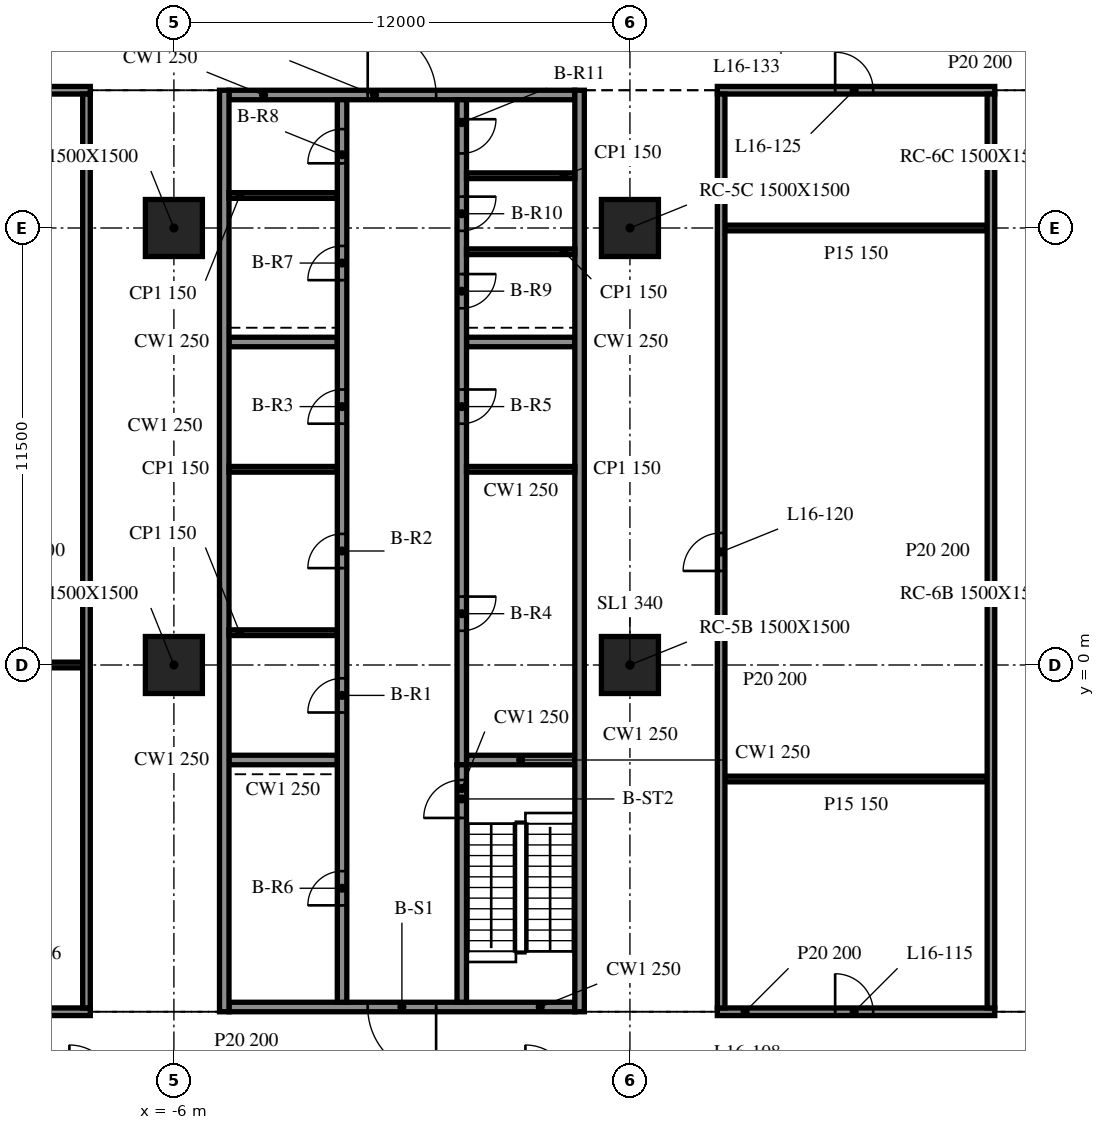
"""IFC4 building model, lengths in metres.
Left out: names, types, materials, properties, quantities, classifications, styles, units other than length and angle.
Written with IfcOpenShell. Run it as: python <this file> out.ifc"""

import sys

from ifc_helpers import new_model, si_unit, direction, frame, frame_2d, origin, origin_2d, place, context, subcontext, project, spatial, rectangle, extrude, element, fill, save


model = new_model("IFC4")
c1 = context("Model", 3, precision=1e-05, world=origin(), true_north=direction((0.0, 1.0)))
c2 = subcontext(c1, "Body", "Model", "MODEL_VIEW")
j1 = project(units=[si_unit("LENGTHUNIT", "METRE"), si_unit("PLANEANGLEUNIT", "RADIAN")], contexts=[c1])
p1 = place(None, origin())
s1 = spatial("IfcSite", under=j1, at=p1, CompositionType="ELEMENT")
p2 = place(p1, origin())
s2 = spatial("IfcBuilding", under=s1, at=p2, CompositionType="ELEMENT")
p3 = place(p2, frame((0.0, 0.0, 71.8)))
s3 = spatial("IfcBuildingStorey", under=s2, at=p3, CompositionType="ELEMENT", Elevation=71.8)
for number, where, z_axis, x_axis in (
    (1, (-6.0, 0.0, -0.34), (0.0, 0.0, 1.0), (1.0, 0.0, 0.0)),
    (2, (-6.0, 11.5, -0.34), (0.0, 0.0, 1.0), (1.0, 0.0, 0.0)),
    (3, (6.0, 0.0, -0.34), (0.0, 0.0, 1.0), (1.0, 0.0, 0.0)),
    (4, (6.0, 11.5, -0.34), (0.0, 0.0, 1.0), (1.0, 0.0, 0.0)),
):
    element("IfcColumn", number, at=place(p3, frame(where, z_axis=z_axis, x_axis=x_axis)), inside=s3, PredefinedType="COLUMN", context=c2, shape_type="SweptSolid", body=[
        extrude(rectangle(XDim=1.5, YDim=1.5, at=origin_2d()), origin(), (0.0, 0.0, 1.0), 4.3),
    ])
for number, where, z_axis, x_axis in (
    (5, (-4.675, 15.125, 0.0), (0.0, 0.0, 1.0), (0.0, -1.0, 0.0)),
    (6, (4.675, -9.125, 0.0), (0.0, 0.0, 1.0), (0.0, 1.0, 0.0)),
):
    element("IfcWall", number, at=place(p3, frame(where, z_axis=z_axis, x_axis=x_axis)), inside=s3, PredefinedType="SOLIDWALL", context=c2, shape_type="SweptSolid", body=[
        extrude(rectangle(XDim=24.25, YDim=0.25, at=frame_2d((12.125, 0.0))), origin(), (0.0, 0.0, 1.0), 3.96),
    ])
p4 = place(p3, frame((4.55, -9.0, 0.0), z_axis=(0.0, 0.0, 1.0), x_axis=(-1.0, 0.0, 0.0)))
e7 = element("IfcWall", 7, at=p4, inside=s3, PredefinedType="SOLIDWALL", context=c2, shape_type="SweptSolid", body=[
    extrude(rectangle(XDim=9.1, YDim=0.25, at=frame_2d((4.55, 0.0))), origin(), (0.0, 0.0, 1.0), 3.96),
])
p5 = place(p4, frame((3.65, 0.0, 0.0)))
e8 = element("IfcOpeningElement", 8, at=p5, cuts=e7, PredefinedType="OPENING", context=c2, shape_type="SweptSolid", body=[
    extrude(rectangle(XDim=1.8, YDim=2.1, at=frame_2d((0.9, 1.05))), frame((0.0, 0.135, 0.0), z_axis=(0.0, -1.0, 0.0), x_axis=(1.0, 0.0, 0.0)), (0.0, 0.0, 1.0), 0.27),
])
p6 = place(p3, frame((-4.55, 15.0, 0.0), z_axis=(0.0, 0.0, 1.0), x_axis=(1.0, 0.0, 0.0)))
e9 = element("IfcWall", 9, at=p6, inside=s3, PredefinedType="SOLIDWALL", context=c2, shape_type="SweptSolid", body=[
    extrude(rectangle(XDim=9.1, YDim=0.25, at=frame_2d((4.55, 0.0))), origin(), (0.0, 0.0, 1.0), 3.96),
])
p7 = place(p6, frame((3.65, 0.0, 0.0)))
e10 = element("IfcOpeningElement", 10, at=p7, cuts=e9, PredefinedType="OPENING", context=c2, shape_type="SweptSolid", body=[
    extrude(rectangle(XDim=1.8, YDim=2.1, at=frame_2d((0.9, 1.05))), frame((0.0, 0.135, 0.0), z_axis=(0.0, -1.0, 0.0), x_axis=(1.0, 0.0, 0.0)), (0.0, 0.0, 1.0), 0.27),
])
p8 = place(p3, frame((-1.575, -8.875, 0.0), z_axis=(0.0, 0.0, 1.0), x_axis=(0.0, 1.0, 0.0)))
e11 = element("IfcWall", 11, at=p8, inside=s3, PredefinedType="SOLIDWALL", context=c2, shape_type="SweptSolid", body=[
    extrude(rectangle(XDim=23.75, YDim=0.25, at=frame_2d((11.875, 0.0))), origin(), (0.0, 0.0, 1.0), 3.96),
])
p9 = place(p8, frame((7.625, 0.0, 0.0)))
e12 = element("IfcOpeningElement", 12, at=p9, cuts=e11, PredefinedType="OPENING", context=c2, shape_type="SweptSolid", body=[
    extrude(rectangle(XDim=0.9, YDim=2.1, at=frame_2d((0.45, 1.05))), frame((0.0, 0.135, 0.0), z_axis=(0.0, -1.0, 0.0), x_axis=(1.0, 0.0, 0.0)), (0.0, 0.0, 1.0), 0.27),
])
p10 = place(p8, frame((11.425, 0.0, 0.0)))
e13 = element("IfcOpeningElement", 13, at=p10, cuts=e11, PredefinedType="OPENING", context=c2, shape_type="SweptSolid", body=[
    extrude(rectangle(XDim=0.9, YDim=2.1, at=frame_2d((0.45, 1.05))), frame((0.0, 0.135, 0.0), z_axis=(0.0, -1.0, 0.0), x_axis=(1.0, 0.0, 0.0)), (0.0, 0.0, 1.0), 0.27),
])
p11 = place(p8, frame((15.225, 0.0, 0.0)))
e14 = element("IfcOpeningElement", 14, at=p11, cuts=e11, PredefinedType="OPENING", context=c2, shape_type="SweptSolid", body=[
    extrude(rectangle(XDim=0.9, YDim=2.1, at=frame_2d((0.45, 1.05))), frame((0.0, 0.135, 0.0), z_axis=(0.0, -1.0, 0.0), x_axis=(1.0, 0.0, 0.0)), (0.0, 0.0, 1.0), 0.27),
])
p12 = place(p8, frame((2.55, 0.0, 0.0)))
e15 = element("IfcOpeningElement", 15, at=p12, cuts=e11, PredefinedType="OPENING", context=c2, shape_type="SweptSolid", body=[
    extrude(rectangle(XDim=0.9, YDim=2.1, at=frame_2d((0.45, 1.05))), frame((0.0, 0.135, 0.0), z_axis=(0.0, -1.0, 0.0), x_axis=(1.0, 0.0, 0.0)), (0.0, 0.0, 1.0), 0.27),
])
p13 = place(p8, frame((19.002, 0.0, 0.0)))
e16 = element("IfcOpeningElement", 16, at=p13, cuts=e11, PredefinedType="OPENING", context=c2, shape_type="SweptSolid", body=[
    extrude(rectangle(XDim=0.9, YDim=2.1, at=frame_2d((0.45, 1.05))), frame((0.0, 0.135, 0.0), z_axis=(0.0, -1.0, 0.0), x_axis=(1.0, 0.0, 0.0)), (0.0, 0.0, 1.0), 0.27),
])
p14 = place(p8, frame((22.077, 0.0, 0.0)))
e17 = element("IfcOpeningElement", 17, at=p14, cuts=e11, PredefinedType="OPENING", context=c2, shape_type="SweptSolid", body=[
    extrude(rectangle(XDim=0.9, YDim=2.1, at=frame_2d((0.45, 1.05))), frame((0.0, 0.135, 0.0), z_axis=(0.0, -1.0, 0.0), x_axis=(1.0, 0.0, 0.0)), (0.0, 0.0, 1.0), 0.27),
])
p15 = place(p3, frame((1.575, -8.875, 0.0), z_axis=(0.0, 0.0, 1.0), x_axis=(0.0, 1.0, 0.0)))
e18 = element("IfcWall", 18, at=p15, inside=s3, PredefinedType="SOLIDWALL", context=c2, shape_type="SweptSolid", body=[
    extrude(rectangle(XDim=6.25, YDim=0.25, at=frame_2d((3.125, 0.0))), origin(), (0.0, 0.0, 1.0), 3.96),
])
p16 = place(p15, frame((4.85, 0.0, 0.0)))
e19 = element("IfcOpeningElement", 19, at=p16, cuts=e18, PredefinedType="OPENING", context=c2, shape_type="SweptSolid", body=[
    extrude(rectangle(XDim=1.0, YDim=2.1, at=frame_2d((0.5, 1.05))), frame((0.0, 0.135, 0.0), z_axis=(0.0, -1.0, 0.0), x_axis=(1.0, 0.0, 0.0)), (0.0, 0.0, 1.0), 0.27),
])
p17 = place(p3, frame((1.575, 14.875, 0.0), z_axis=(0.0, 0.0, 1.0), x_axis=(0.0, -1.0, 0.0)))
e20 = element("IfcWall", 20, at=p17, inside=s3, PredefinedType="SOLIDWALL", context=c2, shape_type="SweptSolid", body=[
    extrude(rectangle(XDim=17.5, YDim=0.25, at=frame_2d((8.75, 0.0))), origin(), (0.0, 0.0, 1.0), 3.96),
])
p18 = place(p17, frame((13.075, 0.0, 0.0)))
e21 = element("IfcOpeningElement", 21, at=p18, cuts=e20, PredefinedType="OPENING", context=c2, shape_type="SweptSolid", body=[
    extrude(rectangle(XDim=0.9, YDim=2.1, at=frame_2d((0.45, 1.05))), frame((0.0, 0.135, 0.0), z_axis=(0.0, -1.0, 0.0), x_axis=(1.0, 0.0, 0.0)), (0.0, 0.0, 1.0), 0.27),
])
p19 = place(p17, frame((7.625, 0.0, 0.0)))
e22 = element("IfcOpeningElement", 22, at=p19, cuts=e20, PredefinedType="OPENING", context=c2, shape_type="SweptSolid", body=[
    extrude(rectangle(XDim=0.9, YDim=2.1, at=frame_2d((0.45, 1.05))), frame((0.0, 0.135, 0.0), z_axis=(0.0, -1.0, 0.0), x_axis=(1.0, 0.0, 0.0)), (0.0, 0.0, 1.0), 0.27),
])
p20 = place(p17, frame((4.587, 0.0, 0.0)))
e23 = element("IfcOpeningElement", 23, at=p20, cuts=e20, PredefinedType="OPENING", context=c2, shape_type="SweptSolid", body=[
    extrude(rectangle(XDim=0.9, YDim=2.1, at=frame_2d((0.45, 1.05))), frame((0.0, 0.135, 0.0), z_axis=(0.0, -1.0, 0.0), x_axis=(1.0, 0.0, 0.0)), (0.0, 0.0, 1.0), 0.27),
])
p21 = place(p17, frame((2.55, 0.0, 0.0)))
e24 = element("IfcOpeningElement", 24, at=p21, cuts=e20, PredefinedType="OPENING", context=c2, shape_type="SweptSolid", body=[
    extrude(rectangle(XDim=0.9, YDim=2.1, at=frame_2d((0.45, 1.05))), frame((0.0, 0.135, 0.0), z_axis=(0.0, -1.0, 0.0), x_axis=(1.0, 0.0, 0.0)), (0.0, 0.0, 1.0), 0.27),
])
p22 = place(p17, frame((0.512, 0.0, 0.0)))
e25 = element("IfcOpeningElement", 25, at=p22, cuts=e20, PredefinedType="OPENING", context=c2, shape_type="SweptSolid", body=[
    extrude(rectangle(XDim=0.9, YDim=2.1, at=frame_2d((0.45, 1.05))), frame((0.0, 0.135, 0.0), z_axis=(0.0, -1.0, 0.0), x_axis=(1.0, 0.0, 0.0)), (0.0, 0.0, 1.0), 0.27),
])
for number, where, z_axis, x_axis in (
    (26, (-4.55, -2.5, 0.0), (0.0, 0.0, 1.0), (1.0, 0.0, 0.0)),
    (27, (-4.55, 8.5, 0.0), (0.0, 0.0, 1.0), (1.0, 0.0, 0.0)),
    (28, (1.7, -2.5, 0.0), (0.0, 0.0, 1.0), (1.0, 0.0, 0.0)),
    (29, (1.7, 8.5, 0.0), (0.0, 0.0, 1.0), (1.0, 0.0, 0.0)),
):
    element("IfcWall", number, at=place(p3, frame(where, z_axis=z_axis, x_axis=x_axis)), inside=s3, PredefinedType="SOLIDWALL", context=c2, shape_type="SweptSolid", body=[
        extrude(rectangle(XDim=2.85, YDim=0.25, at=frame_2d((1.425, 0.0))), origin(), (0.0, 0.0, 1.0), 3.96),
    ])
for number, where, z_axis, x_axis in (
    (30, (-4.55, 0.85, 0.0), (0.0, 0.0, 1.0), (1.0, 0.0, 0.0)),
    (31, (-4.55, 5.15, 0.0), (0.0, 0.0, 1.0), (1.0, 0.0, 0.0)),
    (32, (1.7, 5.15, 0.0), (0.0, 0.0, 1.0), (1.0, 0.0, 0.0)),
    (33, (-4.55, 12.355, 0.0), (0.0, 0.0, 1.0), (1.0, 0.0, 0.0)),
    (34, (1.7, 10.875, 0.0), (0.0, 0.0, 1.0), (1.0, 0.0, 0.0)),
    (35, (1.7, 12.875, 0.0), (0.0, 0.0, 1.0), (1.0, 0.0, 0.0)),
):
    element("IfcWall", number, at=place(p3, frame(where, z_axis=z_axis, x_axis=x_axis)), inside=s3, PredefinedType="PARTITIONING", context=c2, shape_type="SweptSolid", body=[
        extrude(rectangle(XDim=2.85, YDim=0.15, at=frame_2d((1.425, 0.0))), origin(), (0.0, 0.0, 1.0), 3.96),
    ])
p23 = place(p3, frame((-15.9, -9.125, 0.0), z_axis=(0.0, 0.0, 1.0), x_axis=(1.0, 0.0, 0.0)))
e36 = element("IfcWall", 36, at=p23, inside=s3, PredefinedType="PARTITIONING", context=c2, shape_type="SweptSolid", body=[
    extrude(rectangle(XDim=7.7, YDim=0.2, at=frame_2d((3.85, 0.0))), origin(), (0.0, 0.0, 1.0), 3.96),
])
p24 = place(p23, frame((3.3, 0.0, 0.0)))
e37 = element("IfcOpeningElement", 37, at=p24, cuts=e36, PredefinedType="OPENING", context=c2, shape_type="SweptSolid", body=[
    extrude(rectangle(XDim=1.0, YDim=2.1, at=frame_2d((0.5, 1.05))), frame((0.0, 0.11, 0.0), z_axis=(0.0, -1.0, 0.0), x_axis=(1.0, 0.0, 0.0)), (0.0, 0.0, 1.0), 0.22),
])
p25 = place(p3, frame((8.3, -9.125, 0.0), z_axis=(0.0, 0.0, 1.0), x_axis=(1.0, 0.0, 0.0)))
e38 = element("IfcWall", 38, at=p25, inside=s3, PredefinedType="PARTITIONING", context=c2, shape_type="SweptSolid", body=[
    extrude(rectangle(XDim=7.3, YDim=0.2, at=frame_2d((3.65, 0.0))), origin(), (0.0, 0.0, 1.0), 3.96),
])
p26 = place(p25, frame((3.1, 0.0, 0.0)))
e39 = element("IfcOpeningElement", 39, at=p26, cuts=e38, PredefinedType="OPENING", context=c2, shape_type="SweptSolid", body=[
    extrude(rectangle(XDim=1.0, YDim=2.1, at=frame_2d((0.5, 1.05))), frame((0.0, 0.11, 0.0), z_axis=(0.0, -1.0, 0.0), x_axis=(1.0, 0.0, 0.0)), (0.0, 0.0, 1.0), 0.22),
])
p27 = place(p3, frame((8.5, -3.0, 0.0), z_axis=(0.0, 0.0, 1.0), x_axis=(1.0, 0.0, 0.0)))
e40 = element("IfcWall", 40, at=p27, inside=s3, PredefinedType="PARTITIONING", context=c2, shape_type="SweptSolid", body=[
    extrude(rectangle(XDim=6.9, YDim=0.15, at=frame_2d((3.45, 0.0))), origin(), (0.0, 0.0, 1.0), 3.96),
])
p28 = place(p3, frame((-15.7, 0.0, 0.0), z_axis=(0.0, 0.0, 1.0), x_axis=(1.0, 0.0, 0.0)))
e41 = element("IfcWall", 41, at=p28, inside=s3, PredefinedType="PARTITIONING", context=c2, shape_type="SweptSolid", body=[
    extrude(rectangle(XDim=7.3, YDim=0.15, at=frame_2d((3.65, 0.0))), origin(), (0.0, 0.0, 1.0), 3.96),
])
p29 = place(p3, frame((8.5, 11.5, 0.0), z_axis=(0.0, 0.0, 1.0), x_axis=(1.0, 0.0, 0.0)))
e42 = element("IfcWall", 42, at=p29, inside=s3, PredefinedType="PARTITIONING", context=c2, shape_type="SweptSolid", body=[
    extrude(rectangle(XDim=6.9, YDim=0.15, at=frame_2d((3.45, 0.0))), origin(), (0.0, 0.0, 1.0), 3.96),
])
p30 = place(p3, frame((-15.9, 15.125, 0.0), z_axis=(0.0, 0.0, 1.0), x_axis=(1.0, 0.0, 0.0)))
e43 = element("IfcWall", 43, at=p30, inside=s3, PredefinedType="PARTITIONING", context=c2, shape_type="SweptSolid", body=[
    extrude(rectangle(XDim=7.7, YDim=0.2, at=frame_2d((3.85, 0.0))), origin(), (0.0, 0.0, 1.0), 3.96),
])
p31 = place(p3, frame((8.3, 15.125, 0.0), z_axis=(0.0, 0.0, 1.0), x_axis=(1.0, 0.0, 0.0)))
e44 = element("IfcWall", 44, at=p31, inside=s3, PredefinedType="PARTITIONING", context=c2, shape_type="SweptSolid", body=[
    extrude(rectangle(XDim=7.3, YDim=0.2, at=frame_2d((3.65, 0.0))), origin(), (0.0, 0.0, 1.0), 3.96),
])
p32 = place(p31, frame((3.1, 0.0, 0.0)))
e45 = element("IfcOpeningElement", 45, at=p32, cuts=e44, PredefinedType="OPENING", context=c2, shape_type="SweptSolid", body=[
    extrude(rectangle(XDim=1.0, YDim=2.1, at=frame_2d((0.5, 1.05))), frame((0.0, 0.11, 0.0), z_axis=(0.0, -1.0, 0.0), x_axis=(1.0, 0.0, 0.0)), (0.0, 0.0, 1.0), 0.22),
])
p33 = place(p3, frame((-8.3, -9.025, 0.0), z_axis=(0.0, 0.0, 1.0), x_axis=(0.0, 1.0, 0.0)))
e46 = element("IfcWall", 46, at=p33, inside=s3, PredefinedType="PARTITIONING", context=c2, shape_type="SweptSolid", body=[
    extrude(rectangle(XDim=24.05, YDim=0.2, at=frame_2d((12.025, 0.0))), origin(), (0.0, 0.0, 1.0), 3.96),
])
p34 = place(p3, frame((8.4, -9.025, 0.0), z_axis=(0.0, 0.0, 1.0), x_axis=(0.0, 1.0, 0.0)))
e47 = element("IfcWall", 47, at=p34, inside=s3, PredefinedType="PARTITIONING", context=c2, shape_type="SweptSolid", body=[
    extrude(rectangle(XDim=24.05, YDim=0.2, at=frame_2d((12.025, 0.0))), origin(), (0.0, 0.0, 1.0), 3.96),
])
p35 = place(p34, frame((11.5, 0.0, 0.0)))
e48 = element("IfcOpeningElement", 48, at=p35, cuts=e47, PredefinedType="OPENING", context=c2, shape_type="SweptSolid", body=[
    extrude(rectangle(XDim=1.0, YDim=2.1, at=frame_2d((0.5, 1.05))), frame((0.0, 0.11, 0.0), z_axis=(0.0, -1.0, 0.0), x_axis=(1.0, 0.0, 0.0)), (0.0, 0.0, 1.0), 0.22),
])
p36 = place(p3, frame((15.5, -9.025, 0.0), z_axis=(0.0, 0.0, 1.0), x_axis=(0.0, 1.0, 0.0)))
e49 = element("IfcWall", 49, at=p36, inside=s3, PredefinedType="PARTITIONING", context=c2, shape_type="SweptSolid", body=[
    extrude(rectangle(XDim=24.05, YDim=0.2, at=frame_2d((12.025, 0.0))), origin(), (0.0, 0.0, 1.0), 3.96),
])
p37 = place(p5, origin())
e50 = element("IfcDoor", 50, at=p37, inside=s3, OperationType="DOUBLE_DOOR_SINGLE_SWING", PredefinedType="DOOR", context=c2, shape_type="SweptSolid", body=[
    extrude(rectangle(XDim=1.8, YDim=2.1, at=frame_2d((0.9, 1.05))), frame((0.0, 0.025, 0.0), z_axis=(0.0, -1.0, 0.0), x_axis=(1.0, 0.0, 0.0)), (0.0, 0.0, 1.0), 0.05),
])
fill(e8, e50)
p38 = place(p7, origin())
e51 = element("IfcDoor", 51, at=p38, inside=s3, OperationType="DOUBLE_DOOR_SINGLE_SWING", PredefinedType="DOOR", context=c2, shape_type="SweptSolid", body=[
    extrude(rectangle(XDim=1.8, YDim=2.1, at=frame_2d((0.9, 1.05))), frame((0.0, 0.025, 0.0), z_axis=(0.0, -1.0, 0.0), x_axis=(1.0, 0.0, 0.0)), (0.0, 0.0, 1.0), 0.05),
])
fill(e10, e51)
p39 = place(p9, origin())
e52 = element("IfcDoor", 52, at=p39, inside=s3, OperationType="SINGLE_SWING_LEFT", PredefinedType="DOOR", context=c2, shape_type="SweptSolid", body=[
    extrude(rectangle(XDim=0.9, YDim=2.1, at=frame_2d((0.45, 1.05))), frame((0.0, 0.025, 0.0), z_axis=(0.0, -1.0, 0.0), x_axis=(1.0, 0.0, 0.0)), (0.0, 0.0, 1.0), 0.05),
])
fill(e12, e52)
p40 = place(p10, origin())
e53 = element("IfcDoor", 53, at=p40, inside=s3, OperationType="SINGLE_SWING_RIGHT", PredefinedType="DOOR", context=c2, shape_type="SweptSolid", body=[
    extrude(rectangle(XDim=0.9, YDim=2.1, at=frame_2d((0.45, 1.05))), frame((0.0, 0.025, 0.0), z_axis=(0.0, -1.0, 0.0), x_axis=(1.0, 0.0, 0.0)), (0.0, 0.0, 1.0), 0.05),
])
fill(e13, e53)
p41 = place(p11, origin())
e54 = element("IfcDoor", 54, at=p41, inside=s3, OperationType="SINGLE_SWING_LEFT", PredefinedType="DOOR", context=c2, shape_type="SweptSolid", body=[
    extrude(rectangle(XDim=0.9, YDim=2.1, at=frame_2d((0.45, 1.05))), frame((0.0, 0.025, 0.0), z_axis=(0.0, -1.0, 0.0), x_axis=(1.0, 0.0, 0.0)), (0.0, 0.0, 1.0), 0.05),
])
fill(e14, e54)
p42 = place(p18, origin())
e55 = element("IfcDoor", 55, at=p42, inside=s3, OperationType="SINGLE_SWING_RIGHT", PredefinedType="DOOR", context=c2, shape_type="SweptSolid", body=[
    extrude(rectangle(XDim=0.9, YDim=2.1, at=frame_2d((0.45, 1.05))), frame((0.0, 0.025, 0.0), z_axis=(0.0, -1.0, 0.0), x_axis=(1.0, 0.0, 0.0)), (0.0, 0.0, 1.0), 0.05),
])
fill(e21, e55)
p43 = place(p19, origin())
e56 = element("IfcDoor", 56, at=p43, inside=s3, OperationType="SINGLE_SWING_LEFT", PredefinedType="DOOR", context=c2, shape_type="SweptSolid", body=[
    extrude(rectangle(XDim=0.9, YDim=2.1, at=frame_2d((0.45, 1.05))), frame((0.0, 0.025, 0.0), z_axis=(0.0, -1.0, 0.0), x_axis=(1.0, 0.0, 0.0)), (0.0, 0.0, 1.0), 0.05),
])
fill(e22, e56)
p44 = place(p12, origin())
e57 = element("IfcDoor", 57, at=p44, inside=s3, OperationType="SINGLE_SWING_RIGHT", PredefinedType="DOOR", context=c2, shape_type="SweptSolid", body=[
    extrude(rectangle(XDim=0.9, YDim=2.1, at=frame_2d((0.45, 1.05))), frame((0.0, 0.025, 0.0), z_axis=(0.0, -1.0, 0.0), x_axis=(1.0, 0.0, 0.0)), (0.0, 0.0, 1.0), 0.05),
])
fill(e15, e57)
p45 = place(p13, origin())
e58 = element("IfcDoor", 58, at=p45, inside=s3, OperationType="SINGLE_SWING_LEFT", PredefinedType="DOOR", context=c2, shape_type="SweptSolid", body=[
    extrude(rectangle(XDim=0.9, YDim=2.1, at=frame_2d((0.45, 1.05))), frame((0.0, 0.025, 0.0), z_axis=(0.0, -1.0, 0.0), x_axis=(1.0, 0.0, 0.0)), (0.0, 0.0, 1.0), 0.05),
])
fill(e16, e58)
p46 = place(p14, origin())
e59 = element("IfcDoor", 59, at=p46, inside=s3, OperationType="SINGLE_SWING_RIGHT", PredefinedType="DOOR", context=c2, shape_type="SweptSolid", body=[
    extrude(rectangle(XDim=0.9, YDim=2.1, at=frame_2d((0.45, 1.05))), frame((0.0, 0.025, 0.0), z_axis=(0.0, -1.0, 0.0), x_axis=(1.0, 0.0, 0.0)), (0.0, 0.0, 1.0), 0.05),
])
fill(e17, e59)
p47 = place(p20, origin())
e60 = element("IfcDoor", 60, at=p47, inside=s3, OperationType="SINGLE_SWING_LEFT", PredefinedType="DOOR", context=c2, shape_type="SweptSolid", body=[
    extrude(rectangle(XDim=0.9, YDim=2.1, at=frame_2d((0.45, 1.05))), frame((0.0, 0.025, 0.0), z_axis=(0.0, -1.0, 0.0), x_axis=(1.0, 0.0, 0.0)), (0.0, 0.0, 1.0), 0.05),
])
fill(e23, e60)
p48 = place(p21, origin())
e61 = element("IfcDoor", 61, at=p48, inside=s3, OperationType="SINGLE_SWING_RIGHT", PredefinedType="DOOR", context=c2, shape_type="SweptSolid", body=[
    extrude(rectangle(XDim=0.9, YDim=2.1, at=frame_2d((0.45, 1.05))), frame((0.0, 0.025, 0.0), z_axis=(0.0, -1.0, 0.0), x_axis=(1.0, 0.0, 0.0)), (0.0, 0.0, 1.0), 0.05),
])
fill(e24, e61)
p49 = place(p22, origin())
e62 = element("IfcDoor", 62, at=p49, inside=s3, OperationType="SINGLE_SWING_LEFT", PredefinedType="DOOR", context=c2, shape_type="SweptSolid", body=[
    extrude(rectangle(XDim=0.9, YDim=2.1, at=frame_2d((0.45, 1.05))), frame((0.0, 0.025, 0.0), z_axis=(0.0, -1.0, 0.0), x_axis=(1.0, 0.0, 0.0)), (0.0, 0.0, 1.0), 0.05),
])
fill(e25, e62)
p50 = place(p16, origin())
e63 = element("IfcDoor", 63, at=p50, inside=s3, OperationType="SINGLE_SWING_RIGHT", PredefinedType="DOOR", context=c2, shape_type="SweptSolid", body=[
    extrude(rectangle(XDim=1.0, YDim=2.1, at=frame_2d((0.5, 1.05))), frame((0.0, 0.025, 0.0), z_axis=(0.0, -1.0, 0.0), x_axis=(1.0, 0.0, 0.0)), (0.0, 0.0, 1.0), 0.05),
])
fill(e19, e63)
p51 = place(p26, origin())
e64 = element("IfcDoor", 64, at=p51, inside=s3, OperationType="SINGLE_SWING_LEFT", PredefinedType="DOOR", context=c2, shape_type="SweptSolid", body=[
    extrude(rectangle(XDim=1.0, YDim=2.1, at=frame_2d((0.5, 1.05))), frame((0.0, 0.025, 0.0), z_axis=(0.0, -1.0, 0.0), x_axis=(1.0, 0.0, 0.0)), (0.0, 0.0, 1.0), 0.05),
])
fill(e39, e64)
p52 = place(p35, origin())
e65 = element("IfcDoor", 65, at=p52, inside=s3, OperationType="SINGLE_SWING_RIGHT", PredefinedType="DOOR", context=c2, shape_type="SweptSolid", body=[
    extrude(rectangle(XDim=1.0, YDim=2.1, at=frame_2d((0.5, 1.05))), frame((0.0, 0.025, 0.0), z_axis=(0.0, -1.0, 0.0), x_axis=(1.0, 0.0, 0.0)), (0.0, 0.0, 1.0), 0.05),
])
fill(e48, e65)
p53 = place(p32, origin())
e66 = element("IfcDoor", 66, at=p53, inside=s3, OperationType="SINGLE_SWING_RIGHT", PredefinedType="DOOR", context=c2, shape_type="SweptSolid", body=[
    extrude(rectangle(XDim=1.0, YDim=2.1, at=frame_2d((0.5, 1.05))), frame((0.0, 0.025, 0.0), z_axis=(0.0, -1.0, 0.0), x_axis=(1.0, 0.0, 0.0)), (0.0, 0.0, 1.0), 0.05),
])
fill(e45, e66)
save(model, sys.argv[1])
